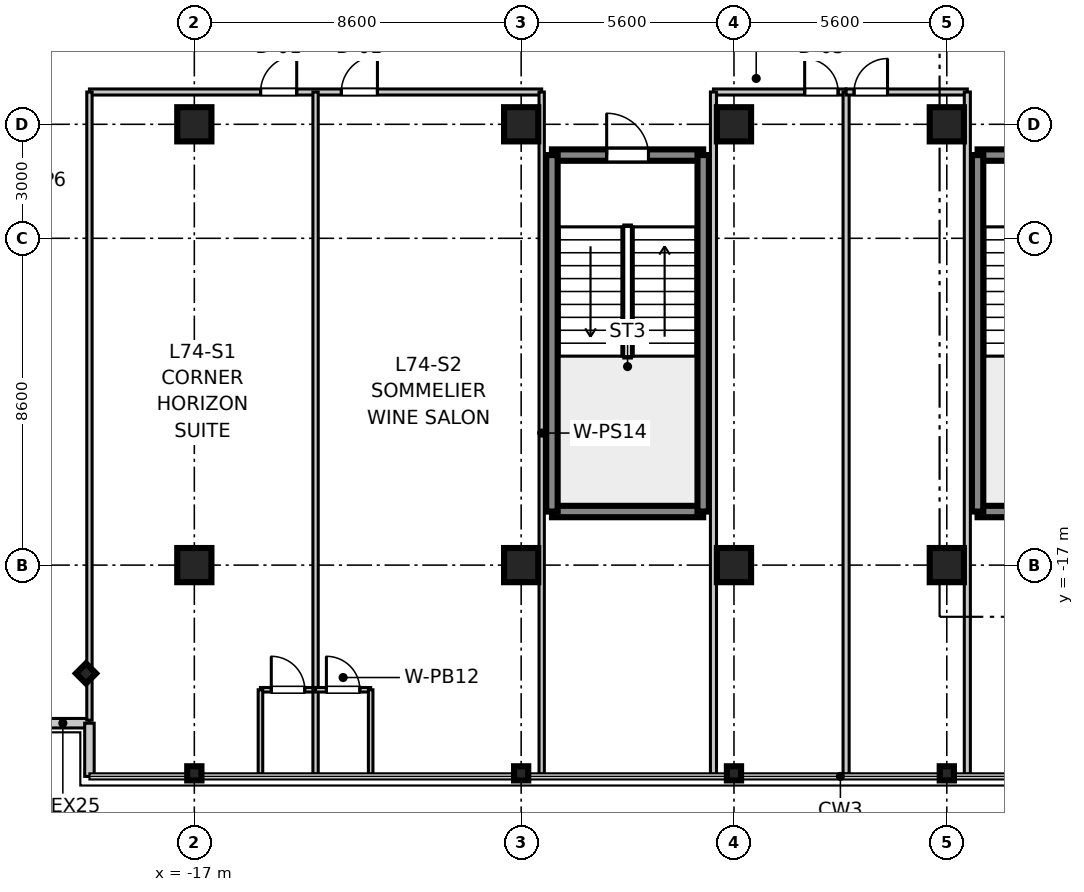
"""IFC4 building model, lengths in metres.
Left out: names, types, materials, properties, quantities, classifications, styles, units other than length and angle.
Written with IfcOpenShell. Run it as: python <this file> out.ifc"""

import sys

from ifc_helpers import new_model, si_unit, direction, frame, frame_2d, origin, origin_2d, place, context, subcontext, project, spatial, rectangle, i_section, extrude, source, transform, mapped, element, fill, save


model = new_model("IFC4")
c1 = context("Model", 3, precision=1e-05, world=origin(), true_north=direction((0.0, 1.0)))
c2 = subcontext(c1, "Body", "Model", "MODEL_VIEW")
j1 = project(units=[si_unit("LENGTHUNIT", "METRE"), si_unit("PLANEANGLEUNIT", "RADIAN")], contexts=[c1])
p1 = place(None, origin())
s1 = spatial("IfcSite", under=j1, at=p1, CompositionType="ELEMENT")
p2 = place(p1, origin())
s2 = spatial("IfcBuilding", under=s1, at=p2, CompositionType="ELEMENT")
p3 = place(p2, frame((0.0, 0.0, 288.8)))
s3 = spatial("IfcBuildingStorey", under=s2, at=p3, CompositionType="ELEMENT", Elevation=288.8)
m1 = source(origin(), c2, "Body", "SweptSolid", [
    extrude(rectangle(XDim=0.9, YDim=0.9, at=origin_2d()), origin(), (0.0, 0.0, 1.0), 3.805),
])
for number, where, z_axis, x_axis in (
    (1, (-17.0, -17.0, 0.0), (0.0, 0.0, 1.0), (1.0, 0.0, 0.0)),
    (2, (-17.0, -5.4, 0.0), (0.0, 0.0, 1.0), (1.0, 0.0, 0.0)),
    (3, (-8.4, -17.0, 0.0), (0.0, 0.0, 1.0), (1.0, 0.0, 0.0)),
    (4, (-8.4, -5.4, 0.0), (0.0, 0.0, 1.0), (1.0, 0.0, 0.0)),
    (5, (-2.8, -17.0, 0.0), (0.0, 0.0, 1.0), (1.0, 0.0, 0.0)),
    (6, (-2.8, -5.4, 0.0), (0.0, 0.0, 1.0), (1.0, 0.0, 0.0)),
    (7, (2.8, -17.0, 0.0), (0.0, 0.0, 1.0), (1.0, 0.0, 0.0)),
    (8, (2.8, -5.4, 0.0), (0.0, 0.0, 1.0), (1.0, 0.0, 0.0)),
):
    element("IfcColumn", number, at=place(p3, frame(where, z_axis=z_axis, x_axis=x_axis)), inside=s3, PredefinedType="COLUMN", context=c2, shape_type="MappedRepresentation", body=[
        mapped(m1, transform((0.0, 0.0, 0.0), scale=1.0)),
    ])
m2 = source(origin(), c2, "Body", "SweptSolid", [
    extrude(i_section(OverallWidth=0.374, OverallDepth=0.374, WebThickness=0.014, FlangeThickness=0.023, at=origin_2d()), origin(), (0.0, 0.0, 1.0), 3.805),
])
for number, where, z_axis, x_axis in (
    (9, (-17.0, -22.48, 0.0), (0.0, 0.0, 1.0), (0.0, 1.0, 0.0)),
    (10, (-8.4, -22.48, 0.0), (0.0, 0.0, 1.0), (0.0, 1.0, 0.0)),
    (11, (-2.8, -22.48, 0.0), (0.0, 0.0, 1.0), (0.0, 1.0, 0.0)),
    (12, (2.8, -22.48, 0.0), (0.0, 0.0, 1.0), (0.0, 1.0, 0.0)),
    (13, (-19.85, -19.85, 0.0), (0.0, 0.0, 1.0), (0.707, 0.707, 0.0)),
):
    element("IfcColumn", number, at=place(p3, frame(where, z_axis=z_axis, x_axis=x_axis)), inside=s3, PredefinedType="COLUMN", context=c2, shape_type="MappedRepresentation", body=[
        mapped(m2, transform((0.0, 0.0, 0.0), scale=1.0)),
    ])
m3 = source(origin(), c2, "Body", "SweptSolid", [
    extrude(rectangle(XDim=3.98, YDim=0.3, at=frame_2d((1.99, 0.0))), origin(), (0.0, 0.0, 1.0), 3.55),
])
for number, where, z_axis, x_axis in (
    (14, (3.61, -15.59, 0.0), (0.0, 0.0, 1.0), (1.0, 0.0, 0.0)),
    (15, (3.61, -6.21, 0.0), (0.0, 0.0, 1.0), (1.0, 0.0, 0.0)),
):
    element("IfcWall", number, at=place(p3, frame(where, z_axis=z_axis, x_axis=x_axis)), inside=s3, PredefinedType="SHEAR", context=c2, shape_type="MappedRepresentation", body=[
        mapped(m3, transform((0.0, 0.0, 0.0), scale=1.0)),
    ])
m4 = source(origin(), c2, "Body", "SweptSolid", [
    extrude(rectangle(XDim=9.38, YDim=0.3, at=frame_2d((4.69, 0.0))), origin(), (0.0, 0.0, 1.0), 3.55),
])
p4 = place(p3, frame((3.61, -15.59, 0.0), z_axis=(0.0, 0.0, 1.0), x_axis=(0.0, 1.0, 0.0)))
e16 = element("IfcWall", 16, at=p4, inside=s3, PredefinedType="SHEAR", context=c2, shape_type="MappedRepresentation", body=[
    mapped(m4, transform((0.0, 0.0, 0.0), scale=1.0)),
])
p5 = place(p3, frame((-7.59, -15.59, 0.0), z_axis=(0.0, 0.0, 1.0), x_axis=(1.0, 0.0, 0.0)))
e17 = element("IfcWall", 17, at=p5, inside=s3, PredefinedType="SHEAR", context=c2, shape_type="MappedRepresentation", body=[
    mapped(m3, transform((0.0, 0.0, 0.0), scale=1.0)),
])
p6 = place(p3, frame((-7.59, -6.21, 0.0), z_axis=(0.0, 0.0, 1.0), x_axis=(1.0, 0.0, 0.0)))
e18 = element("IfcWall", 18, at=p6, inside=s3, PredefinedType="SHEAR", context=c2, shape_type="MappedRepresentation", body=[
    mapped(m3, transform((0.0, 0.0, 0.0), scale=1.0)),
])
p7 = place(p6, frame((1.44, 0.0, 0.0)))
e19 = element("IfcOpeningElement", 19, at=p7, cuts=e18, PredefinedType="OPENING", context=c2, shape_type="SweptSolid", body=[
    extrude(rectangle(XDim=1.1, YDim=2.15, at=frame_2d((0.55, 1.075))), frame((0.0, 0.16, 0.0), z_axis=(0.0, -1.0, 0.0), x_axis=(1.0, 0.0, 0.0)), (0.0, 0.0, 1.0), 0.32),
])
for number, where, z_axis, x_axis in (
    (20, (-7.59, -15.59, 0.0), (0.0, 0.0, 1.0), (0.0, 1.0, 0.0)),
    (21, (-3.61, -15.59, 0.0), (0.0, 0.0, 1.0), (0.0, 1.0, 0.0)),
):
    element("IfcWall", number, at=place(p3, frame(where, z_axis=z_axis, x_axis=x_axis)), inside=s3, PredefinedType="SHEAR", context=c2, shape_type="MappedRepresentation", body=[
        mapped(m4, transform((0.0, 0.0, 0.0), scale=1.0)),
    ])
m5 = source(origin(), c2, "Body", "SweptSolid", [
    extrude(rectangle(XDim=1.4, YDim=0.25, at=frame_2d((0.7, 0.0))), origin(), (0.0, 0.0, 1.0), 3.55),
])
p8 = place(p3, frame((-21.16, -21.16, 0.0), z_axis=(0.0, 0.0, 1.0), x_axis=(1.0, 0.0, 0.0)))
e22 = element("IfcWall", 22, at=p8, inside=s3, PredefinedType="STANDARD", context=c2, shape_type="MappedRepresentation", body=[
    mapped(m5, transform((0.0, 0.0, 0.0), scale=1.0)),
])
m6 = source(origin(), c2, "Body", "SweptSolid", [
    extrude(rectangle(XDim=1.4, YDim=0.25, at=frame_2d((0.7, 0.0))), origin(), (0.0, 0.0, 1.0), 3.55),
])
p9 = place(p3, frame((-19.76, -22.56, 0.0), z_axis=(0.0, 0.0, 1.0), x_axis=(0.0, 1.0, 0.0)))
e23 = element("IfcWall", 23, at=p9, inside=s3, PredefinedType="STANDARD", context=c2, shape_type="MappedRepresentation", body=[
    mapped(m6, transform((0.0, 0.0, 0.0), scale=1.0)),
])
m7 = source(origin(), c2, "Body", "SweptSolid", [
    extrude(rectangle(XDim=11.9, YDim=0.16, at=frame_2d((5.95, 0.0))), origin(), (0.0, 0.0, 1.0), 2.89),
])
p10 = place(p3, frame((-19.76, -4.55, 0.0), z_axis=(0.0, 0.0, 1.0), x_axis=(1.0, 0.0, 0.0)))
e24 = element("IfcWall", 24, at=p10, inside=s3, PredefinedType="PARTITIONING", context=c2, shape_type="MappedRepresentation", body=[
    mapped(m7, transform((0.0, 0.0, 0.0), scale=1.0)),
])
p11 = place(p10, frame((4.504, 0.0, 0.0)))
e25 = element("IfcOpeningElement", 25, at=p11, cuts=e24, PredefinedType="OPENING", context=c2, shape_type="SweptSolid", body=[
    extrude(rectangle(XDim=0.95, YDim=2.1, at=frame_2d((0.475, 1.05))), frame((0.0, 0.09, 0.0), z_axis=(0.0, -1.0, 0.0), x_axis=(1.0, 0.0, 0.0)), (0.0, 0.0, 1.0), 0.18),
])
p12 = place(p10, frame((6.628, 0.0, 0.0)))
e26 = element("IfcOpeningElement", 26, at=p12, cuts=e24, PredefinedType="OPENING", context=c2, shape_type="SweptSolid", body=[
    extrude(rectangle(XDim=0.95, YDim=2.1, at=frame_2d((0.475, 1.05))), frame((0.0, 0.09, 0.0), z_axis=(0.0, -1.0, 0.0), x_axis=(1.0, 0.0, 0.0)), (0.0, 0.0, 1.0), 0.18),
])
m8 = source(origin(), c2, "Body", "SweptSolid", [
    extrude(rectangle(XDim=16.53, YDim=0.14, at=frame_2d((8.265, 0.0))), origin(), (0.0, 0.0, 1.0), 2.89),
])
p13 = place(p3, frame((-19.76, -21.08, 0.0), z_axis=(0.0, 0.0, 1.0), x_axis=(0.0, 1.0, 0.0)))
e27 = element("IfcWall", 27, at=p13, inside=s3, PredefinedType="PARTITIONING", context=c2, shape_type="MappedRepresentation", body=[
    mapped(m8, transform((0.0, 0.0, 0.0), scale=1.0)),
])
m9 = source(origin(), c2, "Body", "SweptSolid", [
    extrude(rectangle(XDim=17.95, YDim=0.14, at=frame_2d((8.975, 0.0))), origin(), (0.0, 0.0, 1.0), 2.89),
])
p14 = place(p3, frame((-7.86, -22.5, 0.0), z_axis=(0.0, 0.0, 1.0), x_axis=(0.0, 1.0, 0.0)))
e28 = element("IfcWall", 28, at=p14, inside=s3, PredefinedType="PARTITIONING", context=c2, shape_type="MappedRepresentation", body=[
    mapped(m9, transform((0.0, 0.0, 0.0), scale=1.0)),
])
m10 = source(origin(), c2, "Body", "SweptSolid", [
    extrude(rectangle(XDim=1.45, YDim=0.12, at=frame_2d((0.725, 0.0))), origin(), (0.0, 0.0, 1.0), 2.89),
])
p15 = place(p3, frame((-15.26, -20.28, 0.0), z_axis=(0.0, 0.0, 1.0), x_axis=(1.0, 0.0, 0.0)))
e29 = element("IfcWall", 29, at=p15, inside=s3, PredefinedType="PARTITIONING", context=c2, shape_type="MappedRepresentation", body=[
    mapped(m10, transform((0.0, 0.0, 0.0), scale=1.0)),
])
p16 = place(p15, frame((0.285, 0.0, 0.0)))
e30 = element("IfcOpeningElement", 30, at=p16, cuts=e29, PredefinedType="OPENING", context=c2, shape_type="SweptSolid", body=[
    extrude(rectangle(XDim=0.88, YDim=2.1, at=frame_2d((0.44, 1.05))), frame((0.0, 0.07, 0.0), z_axis=(0.0, -1.0, 0.0), x_axis=(1.0, 0.0, 0.0)), (0.0, 0.0, 1.0), 0.14),
])
m11 = source(origin(), c2, "Body", "SweptSolid", [
    extrude(rectangle(XDim=2.22, YDim=0.12, at=frame_2d((1.11, 0.0))), origin(), (0.0, 0.0, 1.0), 2.89),
])
p17 = place(p3, frame((-15.26, -22.5, 0.0), z_axis=(0.0, 0.0, 1.0), x_axis=(0.0, 1.0, 0.0)))
e31 = element("IfcWall", 31, at=p17, inside=s3, PredefinedType="PARTITIONING", context=c2, shape_type="MappedRepresentation", body=[
    mapped(m11, transform((0.0, 0.0, 0.0), scale=1.0)),
])
p18 = place(p3, frame((-13.81, -22.5, 0.0), z_axis=(0.0, 0.0, 1.0), x_axis=(0.0, 1.0, 0.0)))
e32 = element("IfcWall", 32, at=p18, inside=s3, PredefinedType="PARTITIONING", context=c2, shape_type="MappedRepresentation", body=[
    mapped(m9, transform((0.0, 0.0, 0.0), scale=1.0)),
])
p19 = place(p3, frame((-13.81, -20.28, 0.0), z_axis=(0.0, 0.0, 1.0), x_axis=(1.0, 0.0, 0.0)))
e33 = element("IfcWall", 33, at=p19, inside=s3, PredefinedType="PARTITIONING", context=c2, shape_type="MappedRepresentation", body=[
    mapped(m10, transform((0.0, 0.0, 0.0), scale=1.0)),
])
p20 = place(p19, frame((0.285, 0.0, 0.0)))
e34 = element("IfcOpeningElement", 34, at=p20, cuts=e33, PredefinedType="OPENING", context=c2, shape_type="SweptSolid", body=[
    extrude(rectangle(XDim=0.88, YDim=2.1, at=frame_2d((0.44, 1.05))), frame((0.0, 0.07, 0.0), z_axis=(0.0, -1.0, 0.0), x_axis=(1.0, 0.0, 0.0)), (0.0, 0.0, 1.0), 0.14),
])
p21 = place(p3, frame((-12.36, -22.5, 0.0), z_axis=(0.0, 0.0, 1.0), x_axis=(0.0, 1.0, 0.0)))
e35 = element("IfcWall", 35, at=p21, inside=s3, PredefinedType="PARTITIONING", context=c2, shape_type="MappedRepresentation", body=[
    mapped(m11, transform((0.0, 0.0, 0.0), scale=1.0)),
])
m12 = source(origin(), c2, "Body", "SweptSolid", [
    extrude(rectangle(XDim=3.49, YDim=0.16, at=frame_2d((1.745, 0.0))), origin(), (0.0, 0.0, 1.0), 2.89),
])
p22 = place(p3, frame((-3.34, -4.55, 0.0), z_axis=(0.0, 0.0, 1.0), x_axis=(1.0, 0.0, 0.0)))
e36 = element("IfcWall", 36, at=p22, inside=s3, PredefinedType="PARTITIONING", context=c2, shape_type="MappedRepresentation", body=[
    mapped(m12, transform((0.0, 0.0, 0.0), scale=1.0)),
])
p23 = place(p22, frame((2.4, 0.0, 0.0)))
e37 = element("IfcOpeningElement", 37, at=p23, cuts=e36, PredefinedType="OPENING", context=c2, shape_type="SweptSolid", body=[
    extrude(rectangle(XDim=0.88, YDim=2.1, at=frame_2d((0.44, 1.05))), frame((0.0, 0.09, 0.0), z_axis=(0.0, -1.0, 0.0), x_axis=(1.0, 0.0, 0.0)), (0.0, 0.0, 1.0), 0.18),
])
m13 = source(origin(), c2, "Body", "SweptSolid", [
    extrude(rectangle(XDim=17.95, YDim=0.16, at=frame_2d((8.975, 0.0))), origin(), (0.0, 0.0, 1.0), 2.89),
])
for number, where, z_axis, x_axis in (
    (38, (-3.34, -22.5, 0.0), (0.0, 0.0, 1.0), (0.0, 1.0, 0.0)),
    (39, (0.15, -22.5, 0.0), (0.0, 0.0, 1.0), (0.0, 1.0, 0.0)),
):
    element("IfcWall", number, at=place(p3, frame(where, z_axis=z_axis, x_axis=x_axis)), inside=s3, PredefinedType="PARTITIONING", context=c2, shape_type="MappedRepresentation", body=[
        mapped(m13, transform((0.0, 0.0, 0.0), scale=1.0)),
    ])
m14 = source(origin(), c2, "Body", "SweptSolid", [
    extrude(rectangle(XDim=3.19, YDim=0.16, at=frame_2d((1.595, 0.0))), origin(), (0.0, 0.0, 1.0), 2.89),
])
p24 = place(p3, frame((0.15, -4.55, 0.0), z_axis=(0.0, 0.0, 1.0), x_axis=(1.0, 0.0, 0.0)))
e40 = element("IfcWall", 40, at=p24, inside=s3, PredefinedType="PARTITIONING", context=c2, shape_type="MappedRepresentation", body=[
    mapped(m14, transform((0.0, 0.0, 0.0), scale=1.0)),
])
p25 = place(p24, frame((0.21, 0.0, 0.0)))
e41 = element("IfcOpeningElement", 41, at=p25, cuts=e40, PredefinedType="OPENING", context=c2, shape_type="SweptSolid", body=[
    extrude(rectangle(XDim=0.88, YDim=2.1, at=frame_2d((0.44, 1.05))), frame((0.0, 0.09, 0.0), z_axis=(0.0, -1.0, 0.0), x_axis=(1.0, 0.0, 0.0)), (0.0, 0.0, 1.0), 0.18),
])
p26 = place(p3, frame((3.34, -22.5, 0.0), z_axis=(0.0, 0.0, 1.0), x_axis=(0.0, 1.0, 0.0)))
e42 = element("IfcWall", 42, at=p26, inside=s3, PredefinedType="PARTITIONING", context=c2, shape_type="MappedRepresentation", body=[
    mapped(m13, transform((0.0, 0.0, 0.0), scale=1.0)),
])
m15 = source(origin(), c2, "Body", "SweptSolid", [
    extrude(rectangle(XDim=1.1, YDim=2.15, at=frame_2d((0.55, 1.075))), frame((0.0, 0.025, 0.0), z_axis=(0.0, -1.0, 0.0), x_axis=(1.0, 0.0, 0.0)), (0.0, 0.0, 1.0), 0.05),
])
p27 = place(p7, frame((1.1, 0.0, 0.0), z_axis=(0.0, 0.0, 1.0), x_axis=(-1.0, 0.0, 0.0)))
e43 = element("IfcDoor", 43, at=p27, inside=s3, OperationType="SINGLE_SWING_LEFT", PredefinedType="DOOR", context=c2, shape_type="MappedRepresentation", body=[
    mapped(m15, transform((0.0, 0.0, 0.0), scale=1.0)),
])
fill(e19, e43)
m16 = source(origin(), c2, "Body", "SweptSolid", [
    extrude(rectangle(XDim=0.88, YDim=2.1, at=frame_2d((0.44, 1.05))), frame((0.0, 0.025, 0.0), z_axis=(0.0, -1.0, 0.0), x_axis=(1.0, 0.0, 0.0)), (0.0, 0.0, 1.0), 0.05),
])
p28 = place(p16, frame((0.88, 0.0, 0.0), z_axis=(0.0, 0.0, 1.0), x_axis=(-1.0, 0.0, 0.0)))
e44 = element("IfcDoor", 44, at=p28, inside=s3, OperationType="SINGLE_SWING_LEFT", PredefinedType="DOOR", context=c2, shape_type="MappedRepresentation", body=[
    mapped(m16, transform((0.0, 0.0, 0.0), scale=1.0)),
])
fill(e30, e44)
m17 = source(origin(), c2, "Body", "SweptSolid", [
    extrude(rectangle(XDim=0.95, YDim=2.1, at=frame_2d((0.475, 1.05))), frame((0.0, 0.025, 0.0), z_axis=(0.0, -1.0, 0.0), x_axis=(1.0, 0.0, 0.0)), (0.0, 0.0, 1.0), 0.05),
])
p29 = place(p11, frame((0.95, 0.0, 0.0), z_axis=(0.0, 0.0, 1.0), x_axis=(-1.0, 0.0, 0.0)))
e45 = element("IfcDoor", 45, at=p29, inside=s3, OperationType="SINGLE_SWING_RIGHT", PredefinedType="DOOR", context=c2, shape_type="MappedRepresentation", body=[
    mapped(m17, transform((0.0, 0.0, 0.0), scale=1.0)),
])
fill(e25, e45)
p30 = place(p20, frame((0.88, 0.0, 0.0), z_axis=(0.0, 0.0, 1.0), x_axis=(-1.0, 0.0, 0.0)))
e46 = element("IfcDoor", 46, at=p30, inside=s3, OperationType="SINGLE_SWING_LEFT", PredefinedType="DOOR", context=c2, shape_type="MappedRepresentation", body=[
    mapped(m16, transform((0.0, 0.0, 0.0), scale=1.0)),
])
fill(e34, e46)
p31 = place(p12, frame((0.95, 0.0, 0.0), z_axis=(0.0, 0.0, 1.0), x_axis=(-1.0, 0.0, 0.0)))
e47 = element("IfcDoor", 47, at=p31, inside=s3, OperationType="SINGLE_SWING_RIGHT", PredefinedType="DOOR", context=c2, shape_type="MappedRepresentation", body=[
    mapped(m17, transform((0.0, 0.0, 0.0), scale=1.0)),
])
fill(e26, e47)
p32 = place(p23, frame((0.88, 0.0, 0.0), z_axis=(0.0, 0.0, 1.0), x_axis=(-1.0, 0.0, 0.0)))
e48 = element("IfcDoor", 48, at=p32, inside=s3, OperationType="SINGLE_SWING_LEFT", PredefinedType="DOOR", context=c2, shape_type="MappedRepresentation", body=[
    mapped(m16, transform((0.0, 0.0, 0.0), scale=1.0)),
])
fill(e37, e48)
p33 = place(p25, frame((0.88, 0.0, 0.0), z_axis=(0.0, 0.0, 1.0), x_axis=(-1.0, 0.0, 0.0)))
e49 = element("IfcDoor", 49, at=p33, inside=s3, OperationType="SINGLE_SWING_RIGHT", PredefinedType="DOOR", context=c2, shape_type="MappedRepresentation", body=[
    mapped(m16, transform((0.0, 0.0, 0.0), scale=1.0)),
])
fill(e41, e49)
save(model, sys.argv[1])
